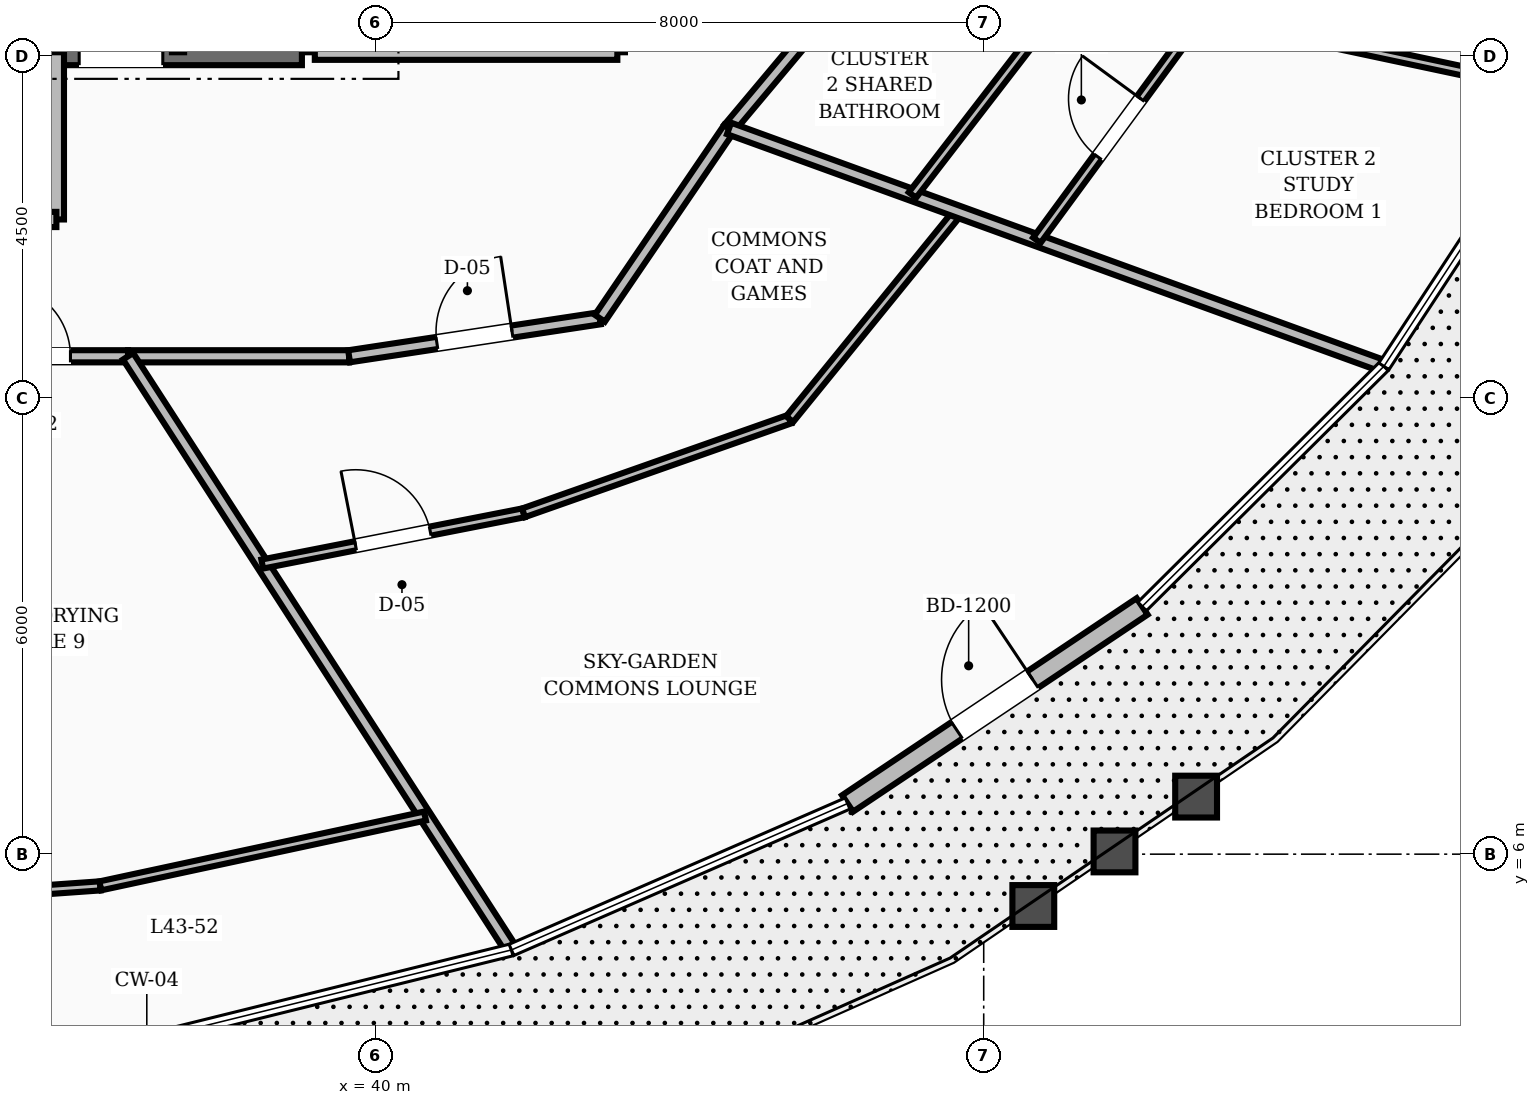
"""IFC4 building model, lengths in metres.
Left out: names, types, materials, properties, quantities, classifications, styles, units other than length and angle.
Written with IfcOpenShell. Run it as: python <this file> out.ifc"""

import sys

from ifc_helpers import new_model, si_unit, direction, frame, frame_2d, origin, place, context, subcontext, project, spatial, rectangle, extrude, element, fill, save


model = new_model("IFC4")
c1 = context("Model", 3, precision=1e-05, world=origin(), true_north=direction((0.0, 1.0)))
c2 = subcontext(c1, "Body", "Model", "MODEL_VIEW")
j1 = project(units=[si_unit("LENGTHUNIT", "METRE"), si_unit("PLANEANGLEUNIT", "RADIAN")], contexts=[c1])
p1 = place(None, origin())
s1 = spatial("IfcSite", under=j1, at=p1, CompositionType="ELEMENT")
p2 = place(p1, origin())
s2 = spatial("IfcBuilding", under=s1, at=p2, CompositionType="ELEMENT")
p3 = place(p2, frame((0.0, 0.0, 167.6)))
s3 = spatial("IfcBuildingStorey", under=s2, at=p3, CompositionType="ELEMENT", Elevation=167.6)
p4 = place(p3, frame((35.8, 16.55, 0.0), z_axis=(0.0, 0.0, 1.0), x_axis=(1.0, 0.0, 0.0)))
e1 = element("IfcWall", 1, at=p4, inside=s3, PredefinedType="SHEAR", context=c2, shape_type="SweptSolid", body=[
    extrude(rectangle(XDim=3.23, YDim=0.34, at=frame_2d((1.615, 0.0))), origin(), (0.0, 0.0, 1.0), 3.6),
])
p5 = place(p4, frame((0.3, 0.0, 0.0)))
e2 = element("IfcOpeningElement", 2, at=p5, cuts=e1, PredefinedType="OPENING", context=c2, shape_type="SweptSolid", body=[
    extrude(rectangle(XDim=1.1, YDim=2.1, at=frame_2d((0.55, 1.05))), frame((0.0, 0.18, 0.0), z_axis=(0.0, -1.0, 0.0), x_axis=(1.0, 0.0, 0.0)), (0.0, 0.0, 1.0), 0.36),
])
p6 = place(p3, frame((46.209, 6.667, 0.0), z_axis=(0.0, 0.0, 1.0), x_axis=(0.831163195786, 0.556028544205, 0.0)))
e3 = element("IfcWall", 3, at=p6, inside=s3, PredefinedType="STANDARD", context=c2, shape_type="SweptSolid", body=[
    extrude(rectangle(XDim=4.663, YDim=0.26, at=frame_2d((2.332, 0.0))), origin(), (0.0, 0.0, 1.0), 2.82),
])
p7 = place(p6, frame((1.731, 0.0, 0.0)))
e4 = element("IfcOpeningElement", 4, at=p7, cuts=e3, PredefinedType="OPENING", context=c2, shape_type="SweptSolid", body=[
    extrude(rectangle(XDim=1.2, YDim=2.15, at=frame_2d((0.6, 1.075))), frame((0.0, 0.14, 0.0), z_axis=(0.0, -1.0, 0.0), x_axis=(1.0, 0.0, 0.0)), (0.0, 0.0, 1.0), 0.28),
])
p8 = place(p3, frame((39.2, 16.55, 0.0), z_axis=(0.0, 0.0, 1.0), x_axis=(1.0, 0.0, 0.0)))
e5 = element("IfcWall", 5, at=p8, inside=s3, PredefinedType="SOLIDWALL", context=c2, shape_type="SweptSolid", body=[
    extrude(rectangle(XDim=3.98, YDim=0.2, at=frame_2d((1.99, 0.0))), origin(), (0.0, 0.0, 1.0), 2.8),
])
p9 = place(p3, frame((35.8, 14.35, 0.0), z_axis=(0.0, 0.0, 1.0), x_axis=(0.0, 1.0, 0.0)))
e6 = element("IfcWall", 6, at=p9, inside=s3, PredefinedType="SOLIDWALL", context=c2, shape_type="SweptSolid", body=[
    extrude(rectangle(XDim=2.2, YDim=0.2, at=frame_2d((1.1, 0.0))), origin(), (0.0, 0.0, 1.0), 2.8),
])
p10 = place(p3, frame((28.2, 14.35, 0.0), z_axis=(0.0, 0.0, 1.0), x_axis=(1.0, 0.0, 0.0)))
e7 = element("IfcWall", 7, at=p10, inside=s3, PredefinedType="SOLIDWALL", context=c2, shape_type="SweptSolid", body=[
    extrude(rectangle(XDim=7.6, YDim=0.2, at=frame_2d((3.8, 0.0))), origin(), (0.0, 0.0, 1.0), 2.8),
])
p11 = place(p10, frame((3.2, 0.0, 0.0)))
e8 = element("IfcOpeningElement", 8, at=p11, cuts=e7, PredefinedType="OPENING", context=c2, shape_type="SweptSolid", body=[
    extrude(rectangle(XDim=1.2, YDim=2.1, at=frame_2d((0.6, 1.05))), frame((0.0, 0.11, 0.0), z_axis=(0.0, -1.0, 0.0), x_axis=(1.0, 0.0, 0.0)), (0.0, 0.0, 1.0), 0.22),
])
p12 = place(p3, frame((34.278, 12.55, 0.0), z_axis=(0.0, 0.0, 1.0), x_axis=(1.0, 0.0, 0.0)))
e9 = element("IfcWall", 9, at=p12, inside=s3, PredefinedType="SOLIDWALL", context=c2, shape_type="SweptSolid", body=[
    extrude(rectangle(XDim=2.465, YDim=0.16, at=frame_2d((1.232, 0.0))), origin(), (0.0, 0.0, 1.0), 2.8),
])
p13 = place(p12, frame((0.758, 0.0, 0.0)))
e10 = element("IfcOpeningElement", 10, at=p13, cuts=e9, PredefinedType="OPENING", context=c2, shape_type="SweptSolid", body=[
    extrude(rectangle(XDim=0.95, YDim=2.1, at=frame_2d((0.475, 1.05))), frame((0.0, 0.09, 0.0), z_axis=(0.0, -1.0, 0.0), x_axis=(1.0, 0.0, 0.0)), (0.0, 0.0, 1.0), 0.18),
])
p14 = place(p3, frame((36.743, 12.55, 0.0), z_axis=(0.0, 0.0, 1.0), x_axis=(1.0, 0.0, 0.0)))
e11 = element("IfcWall", 11, at=p14, inside=s3, PredefinedType="SOLIDWALL", context=c2, shape_type="SweptSolid", body=[
    extrude(rectangle(XDim=2.908, YDim=0.16, at=frame_2d((1.454, 0.0))), origin(), (0.0, 0.0, 1.0), 2.8),
])
p15 = place(p3, frame((39.651, 12.55, 0.0), z_axis=(0.0, 0.0, 1.0), x_axis=(0.988710906508, 0.149835721217, 0.0)))
e12 = element("IfcWall", 12, at=p15, inside=s3, PredefinedType="SOLIDWALL", context=c2, shape_type="SweptSolid", body=[
    extrude(rectangle(XDim=3.337, YDim=0.16, at=frame_2d((1.668, 0.0))), origin(), (0.0, 0.0, 1.0), 2.8),
])
p16 = place(p15, frame((1.168, 0.0, 0.0)))
e13 = element("IfcOpeningElement", 13, at=p16, cuts=e12, PredefinedType="OPENING", context=c2, shape_type="SweptSolid", body=[
    extrude(rectangle(XDim=1.0, YDim=2.1, at=frame_2d((0.5, 1.05))), frame((0.0, 0.09, 0.0), z_axis=(0.0, -1.0, 0.0), x_axis=(1.0, 0.0, 0.0)), (0.0, 0.0, 1.0), 0.18),
])
p17 = place(p3, frame((42.95, 13.05, 0.0), z_axis=(0.0, 0.0, 1.0), x_axis=(0.562674669208, 0.826678423955, 0.0)))
e14 = element("IfcWall", 14, at=p17, inside=s3, PredefinedType="SOLIDWALL", context=c2, shape_type="SweptSolid", body=[
    extrude(rectangle(XDim=3.021, YDim=0.16, at=frame_2d((1.511, 0.0))), origin(), (0.0, 0.0, 1.0), 2.8),
])
p18 = place(p3, frame((44.65, 15.548, 0.0), z_axis=(0.0, 0.0, 1.0), x_axis=(0.642665742791, 0.76614668507, 0.0)))
e15 = element("IfcWall", 15, at=p18, inside=s3, PredefinedType="SOLIDWALL", context=c2, shape_type="SweptSolid", body=[
    extrude(rectangle(XDim=3.112, YDim=0.16, at=frame_2d((1.556, 0.0))), origin(), (0.0, 0.0, 1.0), 2.8),
])
p19 = place(p3, frame((36.743, 12.55, 0.0), z_axis=(0.0, 0.0, 1.0), x_axis=(0.542572394961, -0.840009045324, 0.0)))
e16 = element("IfcWall", 16, at=p19, inside=s3, PredefinedType="SOLIDWALL", context=c2, shape_type="SweptSolid", body=[
    extrude(rectangle(XDim=9.247, YDim=0.16, at=frame_2d((4.624, 0.0))), origin(), (0.0, 0.0, 1.0), 2.8),
])
p20 = place(p3, frame((38.508, 9.817, 0.0), z_axis=(0.0, 0.0, 1.0), x_axis=(0.981313491658, 0.192415776612, 0.0)))
e17 = element("IfcWall", 17, at=p20, inside=s3, PredefinedType="PARTITIONING", context=c2, shape_type="SweptSolid", body=[
    extrude(rectangle(XDim=3.503, YDim=0.12, at=frame_2d((1.751, 0.0))), origin(), (0.0, 0.0, 1.0), 2.8),
])
p21 = place(p20, frame((1.252, 0.0, 0.0)))
e18 = element("IfcOpeningElement", 18, at=p21, cuts=e17, PredefinedType="OPENING", context=c2, shape_type="SweptSolid", body=[
    extrude(rectangle(XDim=1.0, YDim=2.1, at=frame_2d((0.5, 1.05))), frame((0.0, 0.07, 0.0), z_axis=(0.0, -1.0, 0.0), x_axis=(1.0, 0.0, 0.0)), (0.0, 0.0, 1.0), 0.14),
])
p22 = place(p3, frame((41.946, 10.491, 0.0), z_axis=(0.0, 0.0, 1.0), x_axis=(0.943262037543, 0.332049286298, 0.0)))
e19 = element("IfcWall", 19, at=p22, inside=s3, PredefinedType="PARTITIONING", context=c2, shape_type="SweptSolid", body=[
    extrude(rectangle(XDim=3.712, YDim=0.12, at=frame_2d((1.856, 0.0))), origin(), (0.0, 0.0, 1.0), 2.8),
])
p23 = place(p3, frame((45.447, 11.723, 0.0), z_axis=(0.0, 0.0, 1.0), x_axis=(0.630754646961, 0.775982329268, 0.0)))
e20 = element("IfcWall", 20, at=p23, inside=s3, PredefinedType="PARTITIONING", context=c2, shape_type="SweptSolid", body=[
    extrude(rectangle(XDim=3.517, YDim=0.12, at=frame_2d((1.758, 0.0))), origin(), (0.0, 0.0, 1.0), 2.8),
])
p24 = place(p3, frame((44.65, 15.548, 0.0), z_axis=(0.0, 0.0, 1.0), x_axis=(0.93991222373, -0.341416185443, 0.0)))
e21 = element("IfcWall", 21, at=p24, inside=s3, PredefinedType="SOLIDWALL", context=c2, shape_type="SweptSolid", body=[
    extrude(rectangle(XDim=9.116, YDim=0.16, at=frame_2d((4.558, 0.0))), origin(), (0.0, 0.0, 1.0), 2.8),
])
p25 = place(p3, frame((47.062, 14.671, 0.0), z_axis=(0.0, 0.0, 1.0), x_axis=(0.610625572527, 0.791919446772, 0.0)))
e22 = element("IfcWall", 22, at=p25, inside=s3, PredefinedType="PARTITIONING", context=c2, shape_type="SweptSolid", body=[
    extrude(rectangle(XDim=3.442, YDim=0.12, at=frame_2d((1.721, 0.0))), origin(), (0.0, 0.0, 1.0), 2.8),
])
p26 = place(p3, frame((48.699, 14.077, 0.0), z_axis=(0.0, 0.0, 1.0), x_axis=(0.591727106309, 0.806138345235, 0.0)))
e23 = element("IfcWall", 23, at=p26, inside=s3, PredefinedType="PARTITIONING", context=c2, shape_type="SweptSolid", body=[
    extrude(rectangle(XDim=3.669, YDim=0.12, at=frame_2d((1.834, 0.0))), origin(), (0.0, 0.0, 1.0), 2.8),
])
p27 = place(p26, frame((1.359, 0.0, 0.0)))
e24 = element("IfcOpeningElement", 24, at=p27, cuts=e23, PredefinedType="OPENING", context=c2, shape_type="SweptSolid", body=[
    extrude(rectangle(XDim=0.95, YDim=2.1, at=frame_2d((0.475, 1.05))), frame((0.0, 0.07, 0.0), z_axis=(0.0, -1.0, 0.0), x_axis=(1.0, 0.0, 0.0)), (0.0, 0.0, 1.0), 0.14),
])
p28 = place(p3, frame((50.87, 17.034, 0.0), z_axis=(0.0, 0.0, 1.0), x_axis=(0.978131394448, -0.207987920793, 0.0)))
e25 = element("IfcWall", 25, at=p28, inside=s3, PredefinedType="PARTITIONING", context=c2, shape_type="SweptSolid", body=[
    extrude(rectangle(XDim=4.815, YDim=0.12, at=frame_2d((2.407, 0.0))), origin(), (0.0, 0.0, 1.0), 2.8),
])
p29 = place(p3, frame((32.0, 5.273, 0.0), z_axis=(0.0, 0.0, 1.0), x_axis=(0.997497239471, 0.070705425875, 0.0)))
e26 = element("IfcWall", 26, at=p29, inside=s3, PredefinedType="PARTITIONING", context=c2, shape_type="SweptSolid", body=[
    extrude(rectangle(XDim=4.389, YDim=0.12, at=frame_2d((2.194, 0.0))), origin(), (0.0, 0.0, 1.0), 2.8),
])
p30 = place(p29, frame((1.719, 0.0, 0.0)))
e27 = element("IfcOpeningElement", 27, at=p30, cuts=e26, PredefinedType="OPENING", context=c2, shape_type="SweptSolid", body=[
    extrude(rectangle(XDim=0.95, YDim=2.1, at=frame_2d((0.475, 1.05))), frame((0.0, 0.07, 0.0), z_axis=(0.0, -1.0, 0.0), x_axis=(1.0, 0.0, 0.0)), (0.0, 0.0, 1.0), 0.14),
])
p31 = place(p3, frame((36.378, 5.583, 0.0), z_axis=(0.0, 0.0, 1.0), x_axis=(0.977645964839, 0.210257859387, 0.0)))
e28 = element("IfcWall", 28, at=p31, inside=s3, PredefinedType="PARTITIONING", context=c2, shape_type="SweptSolid", body=[
    extrude(rectangle(XDim=4.369, YDim=0.12, at=frame_2d((2.185, 0.0))), origin(), (0.0, 0.0, 1.0), 2.8),
])
p32 = place(p7, origin())
e29 = element("IfcDoor", 29, at=p32, inside=s3, OperationType="SINGLE_SWING_RIGHT", PredefinedType="DOOR", context=c2, shape_type="SweptSolid", body=[
    extrude(rectangle(XDim=1.2, YDim=2.15, at=frame_2d((0.6, 1.075))), frame((0.0, 0.025, 0.0), z_axis=(0.0, -1.0, 0.0), x_axis=(1.0, 0.0, 0.0)), (0.0, 0.0, 1.0), 0.05),
])
fill(e4, e29)
p33 = place(p5, origin())
e30 = element("IfcDoor", 30, at=p33, inside=s3, OperationType="SINGLE_SWING_RIGHT", PredefinedType="DOOR", context=c2, shape_type="SweptSolid", body=[
    extrude(rectangle(XDim=1.1, YDim=2.1, at=frame_2d((0.55, 1.05))), frame((0.0, 0.025, 0.0), z_axis=(0.0, -1.0, 0.0), x_axis=(1.0, 0.0, 0.0)), (0.0, 0.0, 1.0), 0.05),
])
fill(e2, e30)
p34 = place(p16, origin())
e31 = element("IfcDoor", 31, at=p34, inside=s3, OperationType="SINGLE_SWING_RIGHT", PredefinedType="DOOR", context=c2, shape_type="SweptSolid", body=[
    extrude(rectangle(XDim=1.0, YDim=2.1, at=frame_2d((0.5, 1.05))), frame((0.0, 0.025, 0.0), z_axis=(0.0, -1.0, 0.0), x_axis=(1.0, 0.0, 0.0)), (0.0, 0.0, 1.0), 0.05),
])
fill(e13, e31)
p35 = place(p21, origin())
e32 = element("IfcDoor", 32, at=p35, inside=s3, OperationType="SINGLE_SWING_LEFT", PredefinedType="DOOR", context=c2, shape_type="SweptSolid", body=[
    extrude(rectangle(XDim=1.0, YDim=2.1, at=frame_2d((0.5, 1.05))), frame((0.0, 0.025, 0.0), z_axis=(0.0, -1.0, 0.0), x_axis=(1.0, 0.0, 0.0)), (0.0, 0.0, 1.0), 0.05),
])
fill(e18, e32)
p36 = place(p27, origin())
e33 = element("IfcDoor", 33, at=p36, inside=s3, OperationType="SINGLE_SWING_RIGHT", PredefinedType="DOOR", context=c2, shape_type="SweptSolid", body=[
    extrude(rectangle(XDim=0.95, YDim=2.1, at=frame_2d((0.475, 1.05))), frame((0.0, 0.025, 0.0), z_axis=(0.0, -1.0, 0.0), x_axis=(1.0, 0.0, 0.0)), (0.0, 0.0, 1.0), 0.05),
])
fill(e24, e33)
p37 = place(p13, origin())
e34 = element("IfcDoor", 34, at=p37, inside=s3, OperationType="SINGLE_SWING_LEFT", PredefinedType="DOOR", context=c2, shape_type="SweptSolid", body=[
    extrude(rectangle(XDim=0.95, YDim=2.1, at=frame_2d((0.475, 1.05))), frame((0.0, 0.025, 0.0), z_axis=(0.0, -1.0, 0.0), x_axis=(1.0, 0.0, 0.0)), (0.0, 0.0, 1.0), 0.05),
])
fill(e10, e34)
save(model, sys.argv[1])
